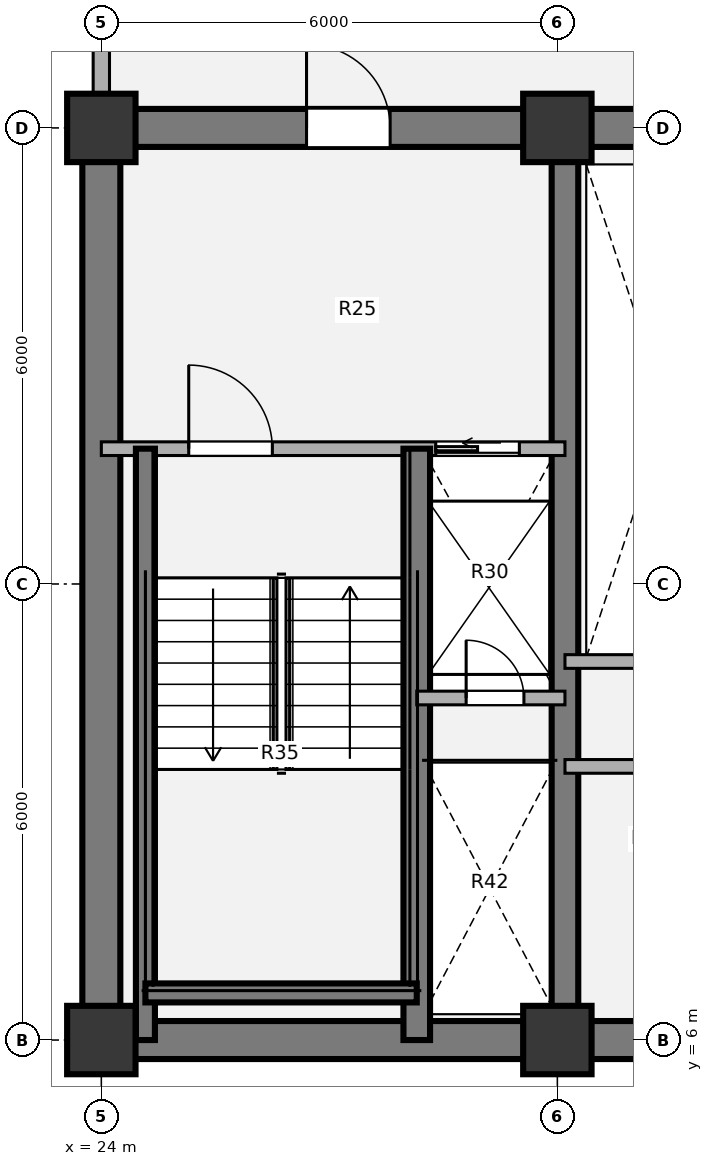
"""IFC4 building model, lengths in metres.
Left out: names, types, materials, properties, quantities, classifications, styles, units other than length and angle.
Written with IfcOpenShell. Run it as: python <this file> out.ifc"""

import sys

from ifc_helpers import new_model, si_unit, direction, frame, frame_2d, origin, origin_2d, place, context, subcontext, project, spatial, rectangle, extrude, source, transform, mapped, element, fill, save


model = new_model("IFC4")
c1 = context("Model", 3, precision=1e-05, world=origin(), true_north=direction((0.0, 1.0)))
c2 = subcontext(c1, "Body", "Model", "MODEL_VIEW")
j1 = project(units=[si_unit("LENGTHUNIT", "METRE"), si_unit("PLANEANGLEUNIT", "RADIAN")], contexts=[c1])
p1 = place(None, origin())
s1 = spatial("IfcSite", under=j1, at=p1, CompositionType="ELEMENT")
p2 = place(p1, origin())
s2 = spatial("IfcBuilding", under=s1, at=p2, CompositionType="ELEMENT")
p3 = place(p2, frame((0.0, 0.0, 89.82)))
s3 = spatial("IfcBuildingStorey", under=s2, at=p3, CompositionType="ELEMENT", Elevation=89.82)
m1 = source(origin(), c2, "Body", "SweptSolid", [
    extrude(rectangle(XDim=0.9, YDim=0.9, at=origin_2d()), origin(), (0.0, 0.0, 1.0), 3.78),
])
for number, where, z_axis, x_axis in (
    (1, (24.0, 6.0, 0.0), (0.0, 0.0, 1.0), (1.0, 0.0, 0.0)),
    (2, (30.0, 6.0, 0.0), (0.0, 0.0, 1.0), (1.0, 0.0, 0.0)),
    (3, (24.0, 18.0, 0.0), (0.0, 0.0, 1.0), (1.0, 0.0, 0.0)),
    (4, (30.0, 18.0, 0.0), (0.0, 0.0, 1.0), (1.0, 0.0, 0.0)),
):
    element("IfcColumn", number, at=place(p3, frame(where, z_axis=z_axis, x_axis=x_axis)), inside=s3, PredefinedType="COLUMN", context=c2, shape_type="MappedRepresentation", body=[
        mapped(m1, transform((0.0, 0.0, 0.0), x_axis=(1.0, 0.0, 0.0), y_axis=(0.0, 1.0, 0.0), z_axis=(0.0, 0.0, 1.0), scale=1.0)),
    ])
p4 = place(p3, frame((48.25, 6.0, 0.0), z_axis=(0.0, 0.0, 1.0), x_axis=(-1.0, 0.0, 0.0)))
e5 = element("IfcWall", 5, at=p4, inside=s3, PredefinedType="SHEAR", context=c2, shape_type="SweptSolid", body=[
    extrude(rectangle(XDim=24.5, YDim=0.5, at=frame_2d((12.25, 0.0))), origin(), (0.0, 0.0, 1.0), 3.78),
])
p5 = place(p3, frame((24.0, 6.0, 0.0), z_axis=(0.0, 0.0, 1.0), x_axis=(0.0, 1.0, 0.0)))
e6 = element("IfcWall", 6, at=p5, inside=s3, PredefinedType="SHEAR", context=c2, shape_type="SweptSolid", body=[
    extrude(rectangle(XDim=12.0, YDim=0.5, at=frame_2d((6.0, 0.0))), origin(), (0.0, 0.0, 1.0), 3.78),
])
p6 = place(p3, frame((23.75, 18.0, 0.0), z_axis=(0.0, 0.0, 1.0), x_axis=(1.0, 0.0, 0.0)))
e7 = element("IfcWall", 7, at=p6, inside=s3, PredefinedType="SHEAR", context=c2, shape_type="SweptSolid", body=[
    extrude(rectangle(XDim=9.45, YDim=0.5, at=frame_2d((4.725, 0.0))), origin(), (0.0, 0.0, 1.0), 3.78),
])
p7 = place(p6, frame((2.95, 0.0, 0.0)))
e8 = element("IfcOpeningElement", 8, at=p7, cuts=e7, PredefinedType="OPENING", context=c2, shape_type="SweptSolid", body=[
    extrude(rectangle(XDim=1.1, YDim=2.1, at=origin_2d()), frame((0.55, 0.26, 1.05), z_axis=(0.0, -1.0, 0.0), x_axis=(1.0, 0.0, 0.0)), (0.0, 0.0, 1.0), 0.52),
])
p8 = place(p3, frame((30.1, 6.0, 0.0), z_axis=(0.0, 0.0, 1.0), x_axis=(0.0, 1.0, 0.0)))
e9 = element("IfcWall", 9, at=p8, inside=s3, PredefinedType="SHEAR", context=c2, shape_type="SweptSolid", body=[
    extrude(rectangle(XDim=12.0, YDim=0.35, at=frame_2d((6.0, 0.0))), origin(), (0.0, 0.0, 1.0), 3.78),
])
p9 = place(p3, frame((24.0, 18.43, 0.0), z_axis=(0.0, 0.0, 1.0), x_axis=(0.0, 1.0, 0.0)))
e10 = element("IfcWall", 10, at=p9, inside=s3, PredefinedType="SOLIDWALL", context=c2, shape_type="SweptSolid", body=[
    extrude(rectangle(XDim=2.62, YDim=0.215, at=frame_2d((1.31, 0.0))), origin(), (0.0, 0.0, 1.0), 3.53),
])
for number, where, z_axis, x_axis in (
    (11, (30.1, 10.98, 0.0), (0.0, 0.0, 1.0), (1.0, 0.0, 0.0)),
    (12, (30.1, 9.6, 0.0), (0.0, 0.0, 1.0), (1.0, 0.0, 0.0)),
):
    element("IfcWall", number, at=place(p3, frame(where, z_axis=z_axis, x_axis=x_axis)), inside=s3, PredefinedType="PARTITIONING", context=c2, shape_type="SweptSolid", body=[
        extrude(rectangle(XDim=2.5, YDim=0.18, at=frame_2d((1.25, 0.0))), origin(), (0.0, 0.0, 1.0), 3.5),
    ])
p10 = place(p3, frame((24.0, 13.78, 0.0), z_axis=(0.0, 0.0, 1.0), x_axis=(1.0, 0.0, 0.0)))
e13 = element("IfcWall", 13, at=p10, inside=s3, PredefinedType="PARTITIONING", context=c2, shape_type="SweptSolid", body=[
    extrude(rectangle(XDim=6.1, YDim=0.18, at=frame_2d((3.05, 0.0))), origin(), (0.0, 0.0, 1.0), 3.5),
])
p11 = place(p10, frame((1.15, 0.0, 0.0)))
e14 = element("IfcOpeningElement", 14, at=p11, cuts=e13, PredefinedType="OPENING", context=c2, shape_type="SweptSolid", body=[
    extrude(rectangle(XDim=1.1, YDim=2.1, at=origin_2d()), frame((0.55, 0.1, 1.05), z_axis=(0.0, -1.0, 0.0), x_axis=(1.0, 0.0, 0.0)), (0.0, 0.0, 1.0), 0.2),
])
p12 = place(p10, frame((4.4, 0.0, 0.0)))
e15 = element("IfcOpeningElement", 15, at=p12, cuts=e13, PredefinedType="OPENING", context=c2, shape_type="SweptSolid", body=[
    extrude(rectangle(XDim=1.1, YDim=2.1, at=origin_2d()), frame((0.55, 0.1, 1.05), z_axis=(0.0, -1.0, 0.0), x_axis=(1.0, 0.0, 0.0)), (0.0, 0.0, 1.0), 0.2),
])
p13 = place(p3, frame((28.15, 6.0, 0.0), z_axis=(0.0, 0.0, 1.0), x_axis=(0.0, 1.0, 0.0)))
e16 = element("IfcWall", 16, at=p13, inside=s3, PredefinedType="SHEAR", context=c2, shape_type="SweptSolid", body=[
    extrude(rectangle(XDim=7.78, YDim=0.35, at=frame_2d((3.89, 0.0))), origin(), (0.0, 0.0, 1.0), 3.85),
])
p14 = place(p3, frame((24.58, 6.0, 0.0), z_axis=(0.0, 0.0, 1.0), x_axis=(0.0, 1.0, 0.0)))
e17 = element("IfcWall", 17, at=p14, inside=s3, PredefinedType="SHEAR", context=c2, shape_type="SweptSolid", body=[
    extrude(rectangle(XDim=7.78, YDim=0.25, at=frame_2d((3.89, 0.0))), origin(), (0.0, 0.0, 1.0), 3.85),
])
p15 = place(p3, frame((24.58, 6.62, 0.0), z_axis=(0.0, 0.0, 1.0), x_axis=(1.0, 0.0, 0.0)))
e18 = element("IfcWall", 18, at=p15, inside=s3, PredefinedType="SHEAR", context=c2, shape_type="SweptSolid", body=[
    extrude(rectangle(XDim=3.57, YDim=0.25, at=frame_2d((1.785, 0.0))), origin(), (0.0, 0.0, 1.0), 3.85),
])
p16 = place(p3, frame((28.15, 10.5, 0.0), z_axis=(0.0, 0.0, 1.0), x_axis=(1.0, 0.0, 0.0)))
e19 = element("IfcWall", 19, at=p16, inside=s3, PredefinedType="PARTITIONING", context=c2, shape_type="SweptSolid", body=[
    extrude(rectangle(XDim=1.95, YDim=0.18, at=frame_2d((0.975, 0.0))), origin(), (0.0, 0.0, 1.0), 3.5),
])
p17 = place(p16, frame((0.65, 0.0, 0.0)))
e20 = element("IfcOpeningElement", 20, at=p17, cuts=e19, PredefinedType="OPENING", context=c2, shape_type="SweptSolid", body=[
    extrude(rectangle(XDim=0.76, YDim=2.05, at=origin_2d()), frame((0.38, 0.1, 1.025), z_axis=(0.0, -1.0, 0.0), x_axis=(1.0, 0.0, 0.0)), (0.0, 0.0, 1.0), 0.2),
])
m2 = source(origin(), c2, "Body", "SweptSolid", [
    extrude(rectangle(XDim=1.1, YDim=2.1, at=origin_2d()), frame((0.55, 0.025, 1.05), z_axis=(0.0, -1.0, 0.0), x_axis=(1.0, 0.0, 0.0)), (0.0, 0.0, 1.0), 0.05),
])
p18 = place(p11, origin())
e21 = element("IfcDoor", 21, at=p18, inside=s3, OperationType="SINGLE_SWING_LEFT", PredefinedType="DOOR", context=c2, shape_type="MappedRepresentation", body=[
    mapped(m2, transform((0.0, 0.0, 0.0), x_axis=(1.0, 0.0, 0.0), y_axis=(0.0, 1.0, 0.0), z_axis=(0.0, 0.0, 1.0), scale=1.0)),
])
fill(e14, e21)
m3 = source(origin(), c2, "Body", "SweptSolid", [
    extrude(rectangle(XDim=1.1, YDim=2.1, at=origin_2d()), frame((0.55, 0.025, 1.05), z_axis=(0.0, -1.0, 0.0), x_axis=(1.0, 0.0, 0.0)), (0.0, 0.0, 1.0), 0.05),
])
p19 = place(p12, origin())
e22 = element("IfcDoor", 22, at=p19, inside=s3, OperationType="SLIDING_TO_LEFT", PredefinedType="DOOR", context=c2, shape_type="MappedRepresentation", body=[
    mapped(m3, transform((0.0, 0.0, 0.0), x_axis=(1.0, 0.0, 0.0), y_axis=(0.0, 1.0, 0.0), z_axis=(0.0, 0.0, 1.0), scale=1.0)),
])
fill(e15, e22)
m4 = source(origin(), c2, "Body", "SweptSolid", [
    extrude(rectangle(XDim=0.76, YDim=2.05, at=origin_2d()), frame((0.38, 0.025, 1.025), z_axis=(0.0, -1.0, 0.0), x_axis=(1.0, 0.0, 0.0)), (0.0, 0.0, 1.0), 0.05),
])
p20 = place(p17, origin())
e23 = element("IfcDoor", 23, at=p20, inside=s3, OperationType="SINGLE_SWING_LEFT", PredefinedType="DOOR", context=c2, shape_type="MappedRepresentation", body=[
    mapped(m4, transform((0.0, 0.0, 0.0), x_axis=(1.0, 0.0, 0.0), y_axis=(0.0, 1.0, 0.0), z_axis=(0.0, 0.0, 1.0), scale=1.0)),
])
fill(e20, e23)
m5 = source(origin(), c2, "Body", "SweptSolid", [
    extrude(rectangle(XDim=1.1, YDim=2.1, at=origin_2d()), frame((0.55, 0.025, 1.05), z_axis=(0.0, -1.0, 0.0), x_axis=(1.0, 0.0, 0.0)), (0.0, 0.0, 1.0), 0.05),
])
p21 = place(p7, origin())
e24 = element("IfcDoor", 24, at=p21, inside=s3, OperationType="SINGLE_SWING_LEFT", PredefinedType="DOOR", context=c2, shape_type="MappedRepresentation", body=[
    mapped(m5, transform((0.0, 0.0, 0.0), x_axis=(1.0, 0.0, 0.0), y_axis=(0.0, 1.0, 0.0), z_axis=(0.0, 0.0, 1.0), scale=1.0)),
])
fill(e8, e24)
save(model, sys.argv[1])
